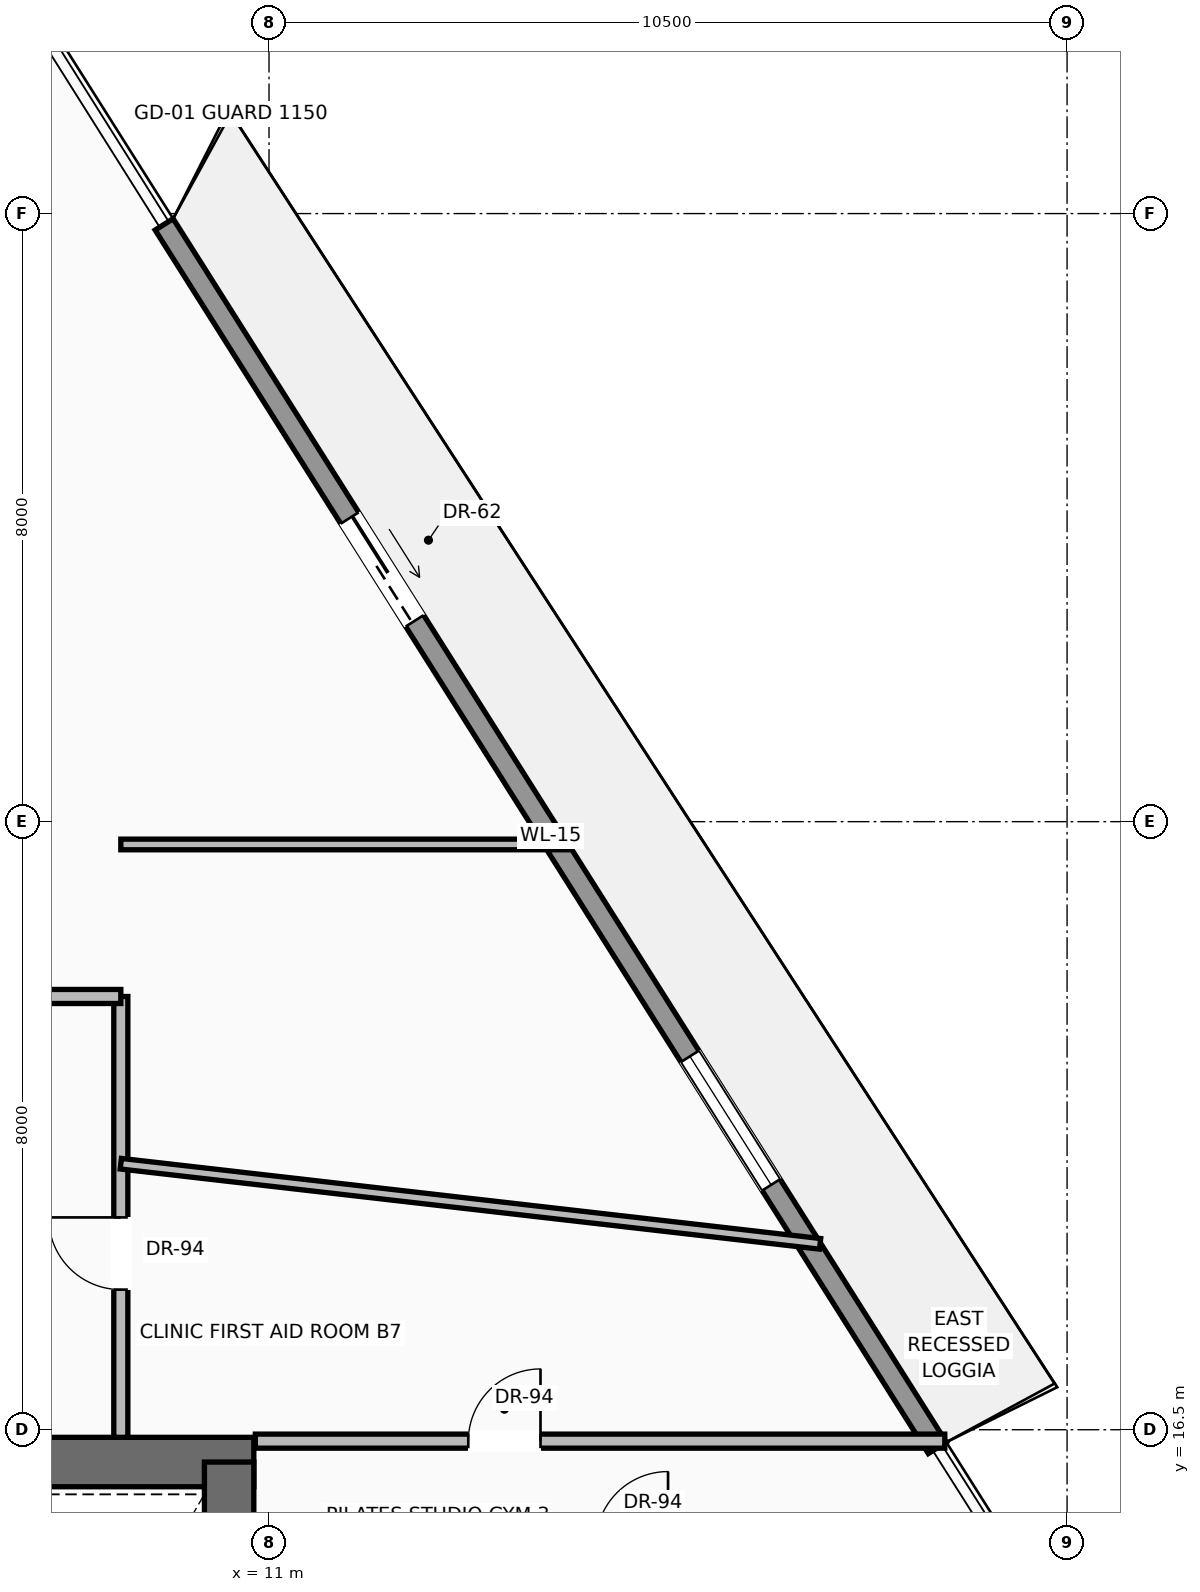
"""IFC4 building model, lengths in metres.
Left out: names, types, materials, properties, quantities, classifications, styles, units other than length and angle.
Written with IfcOpenShell. Run it as: python <this file> out.ifc"""

import sys

from ifc_helpers import new_model, si_unit, direction, frame, frame_2d, origin, place, context, subcontext, project, spatial, rectangle, extrude, source, transform, mapped, element, fill, save


model = new_model("IFC4")
c1 = context("Model", 3, precision=1e-05, world=origin(), true_north=direction((0.0, 1.0)))
c2 = subcontext(c1, "Body", "Model", "MODEL_VIEW")
j1 = project(units=[si_unit("LENGTHUNIT", "METRE"), si_unit("PLANEANGLEUNIT", "RADIAN")], contexts=[c1])
p1 = place(None, origin())
s1 = spatial("IfcSite", under=j1, at=p1, CompositionType="ELEMENT")
p2 = place(p1, origin())
s2 = spatial("IfcBuilding", under=s1, at=p2, CompositionType="ELEMENT")
p3 = place(p2, frame((0.0, 0.0, 196.9)))
s3 = spatial("IfcBuildingStorey", under=s2, at=p3, CompositionType="ELEMENT", Elevation=196.9)
p4 = place(p3, frame((-10.8, 16.075, 0.0), z_axis=(0.0, 0.0, 1.0), x_axis=(1.0, 0.0, 0.0)))
e1 = element("IfcWall", 1, at=p4, inside=s3, PredefinedType="SHEAR", context=c2, shape_type="SweptSolid", body=[
    extrude(rectangle(XDim=21.6, YDim=0.65, at=frame_2d((10.8, 0.0))), origin(), (0.0, 0.0, 1.0), 3.47),
])
p5 = place(p4, frame((3.37, 0.0, 0.0)))
e2 = element("IfcOpeningElement", 2, at=p5, cuts=e1, PredefinedType="OPENING", context=c2, shape_type="SweptSolid", body=[
    extrude(rectangle(XDim=1.3, YDim=2.3, at=frame_2d((0.65, 1.15))), frame((0.0, 0.335, 0.0), z_axis=(0.0, -1.0, 0.0), x_axis=(1.0, 0.0, 0.0)), (0.0, 0.0, 1.0), 0.67),
])
p6 = place(p4, frame((9.8, 0.0, 0.0)))
e3 = element("IfcOpeningElement", 3, at=p6, cuts=e1, PredefinedType="OPENING", context=c2, shape_type="SweptSolid", body=[
    extrude(rectangle(XDim=2.0, YDim=2.4, at=frame_2d((1.0, 1.2))), frame((0.0, 0.335, 0.0), z_axis=(0.0, -1.0, 0.0), x_axis=(1.0, 0.0, 0.0)), (0.0, 0.0, 1.0), 0.67),
])
p7 = place(p3, frame((10.475, 0.525, 0.0), z_axis=(0.0, 0.0, 1.0), x_axis=(0.0, 1.0, 0.0)))
e4 = element("IfcWall", 4, at=p7, inside=s3, PredefinedType="SHEAR", context=c2, shape_type="SweptSolid", body=[
    extrude(rectangle(XDim=15.55, YDim=0.65, at=frame_2d((7.775, 0.0))), origin(), (0.0, 0.0, 1.0), 3.47),
])
p8 = place(p3, frame((9.62, 32.358, 0.0), z_axis=(0.0, 0.0, 1.0), x_axis=(0.534252973029, -0.845324648174, 0.0)))
e5 = element("IfcWall", 5, at=p8, inside=s3, PredefinedType="SOLIDWALL", context=c2, shape_type="SweptSolid", body=[
    extrude(rectangle(XDim=19.042, YDim=0.28, at=frame_2d((9.521, 0.0))), origin(), (0.0, 0.0, 1.0), 3.05),
])
p9 = place(p8, frame((4.57, 0.0, 0.0)))
e6 = element("IfcOpeningElement", 6, at=p9, cuts=e5, PredefinedType="OPENING", context=c2, shape_type="SweptSolid", body=[
    extrude(rectangle(XDim=1.6, YDim=2.35, at=frame_2d((0.8, 1.175))), frame((0.0, 0.15, 0.0), z_axis=(0.0, -1.0, 0.0), x_axis=(1.0, 0.0, 0.0)), (0.0, 0.0, 1.0), 0.3),
])
p10 = place(p8, frame((12.948, 0.0, 0.9)))
e7 = element("IfcOpeningElement", 7, at=p10, cuts=e5, PredefinedType="OPENING", context=c2, shape_type="SweptSolid", body=[
    extrude(rectangle(XDim=2.0, YDim=1.85, at=frame_2d((1.0, 0.925))), frame((0.0, 0.15, 0.0), z_axis=(0.0, -1.0, 0.0), x_axis=(1.0, 0.0, 0.0)), (0.0, 0.0, 1.0), 0.3),
])
p11 = place(p3, frame((9.05, 16.4, 0.0), z_axis=(0.0, 0.0, 1.0), x_axis=(0.0, 1.0, 0.0)))
e8 = element("IfcWall", 8, at=p11, inside=s3, PredefinedType="PARTITIONING", context=c2, shape_type="SweptSolid", body=[
    extrude(rectangle(XDim=5.8, YDim=0.185, at=frame_2d((2.9, 0.0))), origin(), (0.0, 0.0, 1.0), 3.462),
])
p12 = place(p11, frame((1.943, 0.0, 0.0)))
e9 = element("IfcOpeningElement", 9, at=p12, cuts=e8, PredefinedType="OPENING", context=c2, shape_type="SweptSolid", body=[
    extrude(rectangle(XDim=0.95, YDim=2.2, at=frame_2d((0.475, 1.1))), frame((0.0, 0.103, 0.0), z_axis=(0.0, -1.0, 0.0), x_axis=(1.0, 0.0, 0.0)), (0.0, 0.0, 1.0), 0.205),
])
p13 = place(p3, frame((6.85, 22.2, 0.0), z_axis=(0.0, 0.0, 1.0), x_axis=(1.0, 0.0, 0.0)))
e10 = element("IfcWall", 10, at=p13, inside=s3, PredefinedType="PARTITIONING", context=c2, shape_type="SweptSolid", body=[
    extrude(rectangle(XDim=2.2, YDim=0.185, at=frame_2d((1.1, 0.0))), origin(), (0.0, 0.0, 1.0), 3.049),
])
p14 = place(p3, frame((10.82, 16.35, 0.0), z_axis=(0.0, 0.0, 1.0), x_axis=(1.0, 0.0, 0.0)))
e11 = element("IfcWall", 11, at=p14, inside=s3, PredefinedType="PARTITIONING", context=c2, shape_type="SweptSolid", body=[
    extrude(rectangle(XDim=9.071, YDim=0.185, at=frame_2d((4.536, 0.0))), origin(), (0.0, 0.0, 1.0), 3.462),
])
p15 = place(p14, frame((2.802, 0.0, 0.0)))
e12 = element("IfcOpeningElement", 12, at=p15, cuts=e11, PredefinedType="OPENING", context=c2, shape_type="SweptSolid", body=[
    extrude(rectangle(XDim=0.95, YDim=2.2, at=frame_2d((0.475, 1.1))), frame((0.0, 0.103, 0.0), z_axis=(0.0, -1.0, 0.0), x_axis=(1.0, 0.0, 0.0)), (0.0, 0.0, 1.0), 0.205),
])
p16 = place(p3, frame((9.05, 20.0, 0.0), z_axis=(0.0, 0.0, 1.0), x_axis=(0.993499490383, -0.113836560952, 0.0)))
e13 = element("IfcWall", 13, at=p16, inside=s3, PredefinedType="PARTITIONING", context=c2, shape_type="SweptSolid", body=[
    extrude(rectangle(XDim=9.261, YDim=0.14, at=frame_2d((4.63, 0.0))), origin(), (0.0, 0.0, 1.0), 3.049),
])
p17 = place(p3, frame((9.05, 24.2, 0.0), z_axis=(0.0, 0.0, 1.0), x_axis=(1.0, 0.0, 0.0)))
e14 = element("IfcWall", 14, at=p17, inside=s3, PredefinedType="PARTITIONING", context=c2, shape_type="SweptSolid", body=[
    extrude(rectangle(XDim=5.88, YDim=0.14, at=frame_2d((2.94, 0.0))), origin(), (0.0, 0.0, 1.0), 3.462),
])
m1 = source(origin(), c2, "Body", "SweptSolid", [
    extrude(rectangle(XDim=1.6, YDim=2.35, at=frame_2d((0.8, 1.175))), frame((0.0, 0.025, 0.0), z_axis=(0.0, -1.0, 0.0), x_axis=(1.0, 0.0, 0.0)), (0.0, 0.0, 1.0), 0.05),
])
p18 = place(p9, origin())
e15 = element("IfcDoor", 15, at=p18, inside=s3, OperationType="SLIDING_TO_RIGHT", PredefinedType="DOOR", context=c2, shape_type="MappedRepresentation", body=[
    mapped(m1, transform((0.0, 0.0, 0.0), scale=1.0)),
])
fill(e6, e15)
m2 = source(origin(), c2, "Body", "SweptSolid", [
    extrude(rectangle(XDim=2.0, YDim=1.85, at=frame_2d((1.0, 0.925))), frame((0.0, 0.03, 0.0), z_axis=(0.0, -1.0, 0.0), x_axis=(1.0, 0.0, 0.0)), (0.0, 0.0, 1.0), 0.06),
])
p19 = place(p10, origin())
e16 = element("IfcWindow", 16, at=p19, inside=s3, PartitioningType="SINGLE_PANEL", PredefinedType="WINDOW", context=c2, shape_type="MappedRepresentation", body=[
    mapped(m2, transform((0.0, 0.0, 0.0), scale=1.0)),
])
fill(e7, e16)
m3 = source(origin(), c2, "Body", "SweptSolid", [
    extrude(rectangle(XDim=0.95, YDim=2.2, at=frame_2d((0.475, 1.1))), frame((0.0, 0.025, 0.0), z_axis=(0.0, -1.0, 0.0), x_axis=(1.0, 0.0, 0.0)), (0.0, 0.0, 1.0), 0.05),
])
p20 = place(p12, origin())
e17 = element("IfcDoor", 17, at=p20, inside=s3, OperationType="SINGLE_SWING_RIGHT", PredefinedType="DOOR", context=c2, shape_type="MappedRepresentation", body=[
    mapped(m3, transform((0.0, 0.0, 0.0), scale=1.0)),
])
fill(e9, e17)
p21 = place(p15, origin())
e18 = element("IfcDoor", 18, at=p21, inside=s3, OperationType="SINGLE_SWING_RIGHT", PredefinedType="DOOR", context=c2, shape_type="MappedRepresentation", body=[
    mapped(m3, transform((0.0, 0.0, 0.0), scale=1.0)),
])
fill(e12, e18)
save(model, sys.argv[1])
